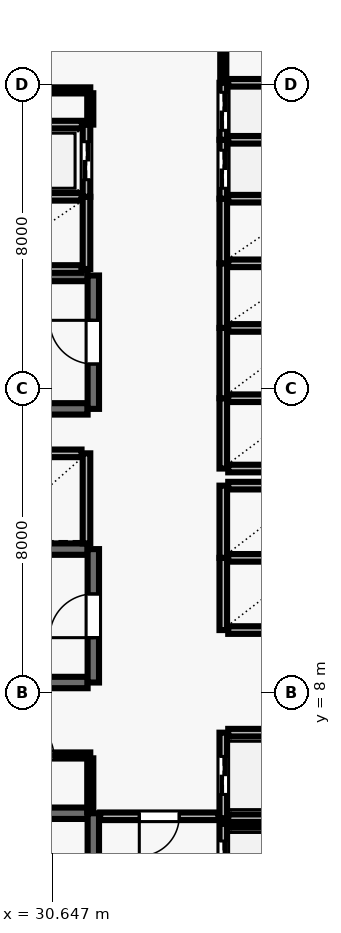
"""IFC4 building model, lengths in metres.
Left out: names, types, materials, properties, quantities, classifications, styles, units other than length and angle.
Written with IfcOpenShell. Run it as: python <this file> out.ifc"""

import sys

from ifc_helpers import new_model, si_unit, direction, frame, frame_2d, origin, place, context, subcontext, project, spatial, rectangle, extrude, element, fill, save


model = new_model("IFC4")
c1 = context("Model", 3, precision=1e-05, world=origin(), true_north=direction((0.0, 1.0)))
c2 = subcontext(c1, "Body", "Model", "MODEL_VIEW")
j1 = project(units=[si_unit("LENGTHUNIT", "METRE"), si_unit("PLANEANGLEUNIT", "RADIAN")], contexts=[c1])
p1 = place(None, origin())
s1 = spatial("IfcSite", under=j1, at=p1, CompositionType="ELEMENT")
p2 = place(p1, origin())
s2 = spatial("IfcBuilding", under=s1, at=p2, CompositionType="ELEMENT")
p3 = place(p2, frame((0.0, 0.0, 77.8)))
s3 = spatial("IfcBuildingStorey", under=s2, at=p3, CompositionType="ELEMENT", Elevation=77.8)
p4 = place(p3, frame((31.58, 4.83, 0.0), z_axis=(0.0, 0.0, 1.0), x_axis=(-1.0, 0.0, 0.0)))
e1 = element("IfcWall", 1, at=p4, inside=s3, PredefinedType="SHEAR", context=c2, shape_type="SweptSolid", body=[
    extrude(rectangle(XDim=8.36, YDim=0.3, at=frame_2d((4.18, 0.0))), origin(), (0.0, 0.0, 1.0), 3.69),
])
p5 = place(p3, frame((31.73, 0.96, 0.0), z_axis=(0.0, 0.0, 1.0), x_axis=(0.0, 1.0, 0.0)))
e2 = element("IfcWall", 2, at=p5, inside=s3, PredefinedType="SHEAR", context=c2, shape_type="SweptSolid", body=[
    extrude(rectangle(XDim=3.87, YDim=0.3, at=frame_2d((1.935, 0.0))), origin(), (0.0, 0.0, 1.0), 3.69),
])
p6 = place(p5, frame((1.54, 0.0, 0.0)))
e3 = element("IfcOpeningElement", 3, at=p6, cuts=e2, PredefinedType="OPENING", context=c2, shape_type="SweptSolid", body=[
    extrude(rectangle(XDim=1.15, YDim=2.15, at=frame_2d((0.575, 1.075))), frame((0.0, 0.16, 0.0), z_axis=(0.0, -1.0, 0.0), x_axis=(1.0, 0.0, 0.0)), (0.0, 0.0, 1.0), 0.32),
])
for number, where, z_axis, x_axis in (
    (4, (31.58, 18.98, 0.0), (0.0, 0.0, 1.0), (-1.0, 0.0, 0.0)),
    (5, (23.22, 15.47, 0.0), (0.0, 0.0, 1.0), (1.0, 0.0, 0.0)),
):
    element("IfcWall", number, at=place(p3, frame(where, z_axis=z_axis, x_axis=x_axis)), inside=s3, PredefinedType="SHEAR", context=c2, shape_type="SweptSolid", body=[
        extrude(rectangle(XDim=8.36, YDim=0.3, at=frame_2d((4.18, 0.0))), origin(), (0.0, 0.0, 1.0), 3.69),
    ])
p7 = place(p3, frame((31.73, 15.47, 0.0), z_axis=(0.0, 0.0, 1.0), x_axis=(0.0, 1.0, 0.0)))
e6 = element("IfcWall", 6, at=p7, inside=s3, PredefinedType="SHEAR", context=c2, shape_type="SweptSolid", body=[
    extrude(rectangle(XDim=3.51, YDim=0.3, at=frame_2d((1.755, 0.0))), origin(), (0.0, 0.0, 1.0), 3.69),
])
p8 = place(p7, frame((1.18, 0.0, 0.0)))
e7 = element("IfcOpeningElement", 7, at=p8, cuts=e6, PredefinedType="OPENING", context=c2, shape_type="SweptSolid", body=[
    extrude(rectangle(XDim=1.15, YDim=2.15, at=frame_2d((0.575, 1.075))), frame((0.0, 0.16, 0.0), z_axis=(0.0, -1.0, 0.0), x_axis=(1.0, 0.0, 0.0)), (0.0, 0.0, 1.0), 0.32),
])
for number, where, z_axis, x_axis in (
    (8, (31.58, 11.78, 0.0), (0.0, 0.0, 1.0), (-1.0, 0.0, 0.0)),
    (9, (23.22, 8.27, 0.0), (0.0, 0.0, 1.0), (1.0, 0.0, 0.0)),
):
    element("IfcWall", number, at=place(p3, frame(where, z_axis=z_axis, x_axis=x_axis)), inside=s3, PredefinedType="SHEAR", context=c2, shape_type="SweptSolid", body=[
        extrude(rectangle(XDim=8.36, YDim=0.3, at=frame_2d((4.18, 0.0))), origin(), (0.0, 0.0, 1.0), 3.69),
    ])
p9 = place(p3, frame((31.73, 8.27, 0.0), z_axis=(0.0, 0.0, 1.0), x_axis=(0.0, 1.0, 0.0)))
e10 = element("IfcWall", 10, at=p9, inside=s3, PredefinedType="SHEAR", context=c2, shape_type="SweptSolid", body=[
    extrude(rectangle(XDim=3.51, YDim=0.3, at=frame_2d((1.755, 0.0))), origin(), (0.0, 0.0, 1.0), 3.69),
])
p10 = place(p9, frame((1.18, 0.0, 0.0)))
e11 = element("IfcOpeningElement", 11, at=p10, cuts=e10, PredefinedType="OPENING", context=c2, shape_type="SweptSolid", body=[
    extrude(rectangle(XDim=1.15, YDim=2.15, at=frame_2d((0.575, 1.075))), frame((0.0, 0.16, 0.0), z_axis=(0.0, -1.0, 0.0), x_axis=(1.0, 0.0, 0.0)), (0.0, 0.0, 1.0), 0.32),
])
p11 = place(p3, frame((35.15, 4.55, 0.0), z_axis=(0.0, 0.0, 1.0), x_axis=(0.0, -1.0, 0.0)))
e12 = element("IfcWall", 12, at=p11, inside=s3, PredefinedType="SOLIDWALL", context=c2, shape_type="SweptSolid", body=[
    extrude(rectangle(XDim=2.1, YDim=0.2, at=frame_2d((1.05, 0.0))), origin(), (0.0, 0.0, 1.0), 3.69),
])
p12 = place(p11, frame((0.45, 0.0, 0.0)))
e13 = element("IfcOpeningElement", 13, at=p12, cuts=e12, PredefinedType="OPENING", context=c2, shape_type="SweptSolid", body=[
    extrude(rectangle(XDim=1.2, YDim=2.15, at=frame_2d((0.6, 1.075))), frame((0.0, 0.11, 0.0), z_axis=(0.0, -1.0, 0.0), x_axis=(1.0, 0.0, 0.0)), (0.0, 0.0, 1.0), 0.22),
])
p13 = place(p3, frame((37.42, 4.55, 0.0), z_axis=(0.0, 0.0, 1.0), x_axis=(-1.0, 0.0, 0.0)))
e14 = element("IfcWall", 14, at=p13, inside=s3, PredefinedType="SOLIDWALL", context=c2, shape_type="SweptSolid", body=[
    extrude(rectangle(XDim=2.14, YDim=0.2, at=frame_2d((1.07, 0.0))), origin(), (0.0, 0.0, 1.0), 3.69),
])
p14 = place(p3, frame((35.15, 6.95, 0.0), z_axis=(0.0, 0.0, 1.0), x_axis=(0.0, -1.0, 0.0)))
e15 = element("IfcWall", 15, at=p14, inside=s3, PredefinedType="SOLIDWALL", context=c2, shape_type="SweptSolid", body=[
    extrude(rectangle(XDim=2.25, YDim=0.2, at=frame_2d((1.125, 0.0))), origin(), (0.0, 0.0, 1.0), 3.69),
])
p15 = place(p14, frame((0.625, 0.0, 0.0)))
e16 = element("IfcOpeningElement", 16, at=p15, cuts=e15, PredefinedType="OPENING", context=c2, shape_type="SweptSolid", body=[
    extrude(rectangle(XDim=1.0, YDim=2.1, at=frame_2d((0.5, 1.05))), frame((0.0, 0.11, 0.0), z_axis=(0.0, -1.0, 0.0), x_axis=(1.0, 0.0, 0.0)), (0.0, 0.0, 1.0), 0.22),
])
for number, where, z_axis, x_axis in (
    (17, (35.28, 4.7, 0.0), (0.0, 0.0, 1.0), (1.0, 0.0, 0.0)),
    (18, (37.42, 6.95, 0.0), (0.0, 0.0, 1.0), (-1.0, 0.0, 0.0)),
):
    element("IfcWall", number, at=place(p3, frame(where, z_axis=z_axis, x_axis=x_axis)), inside=s3, PredefinedType="SOLIDWALL", context=c2, shape_type="SweptSolid", body=[
        extrude(rectangle(XDim=2.14, YDim=0.2, at=frame_2d((1.07, 0.0))), origin(), (0.0, 0.0, 1.0), 3.69),
    ])
p16 = place(p3, frame((35.15, 11.55, 0.0), z_axis=(0.0, 0.0, 1.0), x_axis=(0.0, -1.0, 0.0)))
e19 = element("IfcWall", 19, at=p16, inside=s3, PredefinedType="SOLIDWALL", context=c2, shape_type="SweptSolid", body=[
    extrude(rectangle(XDim=1.9, YDim=0.2, at=frame_2d((0.95, 0.0))), origin(), (0.0, 0.0, 1.0), 3.69),
])
for number, where, z_axis, x_axis in (
    (20, (35.28, 9.65, 0.0), (0.0, 0.0, 1.0), (1.0, 0.0, 0.0)),
    (21, (37.42, 11.55, 0.0), (0.0, 0.0, 1.0), (-1.0, 0.0, 0.0)),
):
    element("IfcWall", number, at=place(p3, frame(where, z_axis=z_axis, x_axis=x_axis)), inside=s3, PredefinedType="SOLIDWALL", context=c2, shape_type="SweptSolid", body=[
        extrude(rectangle(XDim=2.14, YDim=0.2, at=frame_2d((1.07, 0.0))), origin(), (0.0, 0.0, 1.0), 3.69),
    ])
p17 = place(p3, frame((35.15, 13.45, 0.0), z_axis=(0.0, 0.0, 1.0), x_axis=(0.0, -1.0, 0.0)))
e22 = element("IfcWall", 22, at=p17, inside=s3, PredefinedType="SOLIDWALL", context=c2, shape_type="SweptSolid", body=[
    extrude(rectangle(XDim=1.9, YDim=0.2, at=frame_2d((0.95, 0.0))), origin(), (0.0, 0.0, 1.0), 3.69),
])
p18 = place(p3, frame((37.42, 13.45, 0.0), z_axis=(0.0, 0.0, 1.0), x_axis=(-1.0, 0.0, 0.0)))
e23 = element("IfcWall", 23, at=p18, inside=s3, PredefinedType="SOLIDWALL", context=c2, shape_type="SweptSolid", body=[
    extrude(rectangle(XDim=2.14, YDim=0.2, at=frame_2d((1.07, 0.0))), origin(), (0.0, 0.0, 1.0), 3.69),
])
p19 = place(p3, frame((31.55, 11.93, 0.0), z_axis=(0.0, 0.0, 1.0), x_axis=(0.0, 1.0, 0.0)))
e24 = element("IfcWall", 24, at=p19, inside=s3, PredefinedType="SOLIDWALL", context=c2, shape_type="SweptSolid", body=[
    extrude(rectangle(XDim=2.37, YDim=0.2, at=frame_2d((1.185, 0.0))), origin(), (0.0, 0.0, 1.0), 3.69),
])
p20 = place(p3, frame((31.42, 14.3, 0.0), z_axis=(0.0, 0.0, 1.0), x_axis=(-1.0, 0.0, 0.0)))
e25 = element("IfcWall", 25, at=p20, inside=s3, PredefinedType="SOLIDWALL", context=c2, shape_type="SweptSolid", body=[
    extrude(rectangle(XDim=2.44, YDim=0.2, at=frame_2d((1.22, 0.0))), origin(), (0.0, 0.0, 1.0), 3.69),
])
p21 = place(p3, frame((35.15, 15.75, 0.0), z_axis=(0.0, 0.0, 1.0), x_axis=(0.0, -1.0, 0.0)))
e26 = element("IfcWall", 26, at=p21, inside=s3, PredefinedType="SOLIDWALL", context=c2, shape_type="SweptSolid", body=[
    extrude(rectangle(XDim=1.85, YDim=0.2, at=frame_2d((0.925, 0.0))), origin(), (0.0, 0.0, 1.0), 3.69),
])
for number, where, z_axis, x_axis in (
    (27, (35.28, 13.9, 0.0), (0.0, 0.0, 1.0), (1.0, 0.0, 0.0)),
    (28, (37.42, 15.75, 0.0), (0.0, 0.0, 1.0), (-1.0, 0.0, 0.0)),
):
    element("IfcWall", number, at=place(p3, frame(where, z_axis=z_axis, x_axis=x_axis)), inside=s3, PredefinedType="SOLIDWALL", context=c2, shape_type="SweptSolid", body=[
        extrude(rectangle(XDim=2.14, YDim=0.2, at=frame_2d((1.07, 0.0))), origin(), (0.0, 0.0, 1.0), 3.69),
    ])
p22 = place(p3, frame((35.15, 17.6, 0.0), z_axis=(0.0, 0.0, 1.0), x_axis=(0.0, -1.0, 0.0)))
e29 = element("IfcWall", 29, at=p22, inside=s3, PredefinedType="SOLIDWALL", context=c2, shape_type="SweptSolid", body=[
    extrude(rectangle(XDim=1.85, YDim=0.2, at=frame_2d((0.925, 0.0))), origin(), (0.0, 0.0, 1.0), 3.69),
])
p23 = place(p3, frame((37.42, 17.6, 0.0), z_axis=(0.0, 0.0, 1.0), x_axis=(-1.0, 0.0, 0.0)))
e30 = element("IfcWall", 30, at=p23, inside=s3, PredefinedType="SOLIDWALL", context=c2, shape_type="SweptSolid", body=[
    extrude(rectangle(XDim=2.14, YDim=0.2, at=frame_2d((1.07, 0.0))), origin(), (0.0, 0.0, 1.0), 3.69),
])
p24 = place(p3, frame((35.15, 19.3, 0.0), z_axis=(0.0, 0.0, 1.0), x_axis=(0.0, -1.0, 0.0)))
e31 = element("IfcWall", 31, at=p24, inside=s3, PredefinedType="SOLIDWALL", context=c2, shape_type="SweptSolid", body=[
    extrude(rectangle(XDim=1.7, YDim=0.2, at=frame_2d((0.85, 0.0))), origin(), (0.0, 0.0, 1.0), 3.69),
])
p25 = place(p3, frame((37.42, 19.3, 0.0), z_axis=(0.0, 0.0, 1.0), x_axis=(-1.0, 0.0, 0.0)))
e32 = element("IfcWall", 32, at=p25, inside=s3, PredefinedType="SOLIDWALL", context=c2, shape_type="SweptSolid", body=[
    extrude(rectangle(XDim=2.14, YDim=0.2, at=frame_2d((1.07, 0.0))), origin(), (0.0, 0.0, 1.0), 3.69),
])
p26 = place(p3, frame((35.15, 21.0, 0.0), z_axis=(0.0, 0.0, 1.0), x_axis=(0.0, -1.0, 0.0)))
e33 = element("IfcWall", 33, at=p26, inside=s3, PredefinedType="SOLIDWALL", context=c2, shape_type="SweptSolid", body=[
    extrude(rectangle(XDim=1.7, YDim=0.2, at=frame_2d((0.85, 0.0))), origin(), (0.0, 0.0, 1.0), 3.69),
])
p27 = place(p3, frame((37.42, 21.0, 0.0), z_axis=(0.0, 0.0, 1.0), x_axis=(-1.0, 0.0, 0.0)))
e34 = element("IfcWall", 34, at=p27, inside=s3, PredefinedType="SOLIDWALL", context=c2, shape_type="SweptSolid", body=[
    extrude(rectangle(XDim=2.14, YDim=0.2, at=frame_2d((1.07, 0.0))), origin(), (0.0, 0.0, 1.0), 3.69),
])
p28 = place(p3, frame((31.55, 19.15, 0.0), z_axis=(0.0, 0.0, 1.0), x_axis=(0.0, 1.0, 0.0)))
e35 = element("IfcWall", 35, at=p28, inside=s3, PredefinedType="SOLIDWALL", context=c2, shape_type="SweptSolid", body=[
    extrude(rectangle(XDim=1.9, YDim=0.2, at=frame_2d((0.95, 0.0))), origin(), (0.0, 0.0, 1.0), 3.69),
])
for number, where, z_axis, x_axis in (
    (36, (28.98, 19.15, 0.0), (0.0, 0.0, 1.0), (1.0, 0.0, 0.0)),
    (37, (31.42, 21.05, 0.0), (0.0, 0.0, 1.0), (-1.0, 0.0, 0.0)),
):
    element("IfcWall", number, at=place(p3, frame(where, z_axis=z_axis, x_axis=x_axis)), inside=s3, PredefinedType="SOLIDWALL", context=c2, shape_type="SweptSolid", body=[
        extrude(rectangle(XDim=2.44, YDim=0.2, at=frame_2d((1.22, 0.0))), origin(), (0.0, 0.0, 1.0), 3.69),
    ])
p29 = place(p3, frame((35.15, 22.55, 0.0), z_axis=(0.0, 0.0, 1.0), x_axis=(0.0, -1.0, 0.0)))
e38 = element("IfcWall", 38, at=p29, inside=s3, PredefinedType="SOLIDWALL", context=c2, shape_type="SweptSolid", body=[
    extrude(rectangle(XDim=1.55, YDim=0.2, at=frame_2d((0.775, 0.0))), origin(), (0.0, 0.0, 1.0), 3.69),
])
p30 = place(p29, frame((0.275, 0.0, 0.0)))
e39 = element("IfcOpeningElement", 39, at=p30, cuts=e38, PredefinedType="OPENING", context=c2, shape_type="SweptSolid", body=[
    extrude(rectangle(XDim=1.0, YDim=2.1, at=frame_2d((0.5, 1.05))), frame((0.0, 0.11, 0.0), z_axis=(0.0, -1.0, 0.0), x_axis=(1.0, 0.0, 0.0)), (0.0, 0.0, 1.0), 0.22),
])
p31 = place(p3, frame((37.42, 22.55, 0.0), z_axis=(0.0, 0.0, 1.0), x_axis=(-1.0, 0.0, 0.0)))
e40 = element("IfcWall", 40, at=p31, inside=s3, PredefinedType="SOLIDWALL", context=c2, shape_type="SweptSolid", body=[
    extrude(rectangle(XDim=2.14, YDim=0.2, at=frame_2d((1.07, 0.0))), origin(), (0.0, 0.0, 1.0), 3.69),
])
p32 = place(p3, frame((35.15, 24.05, 0.0), z_axis=(0.0, 0.0, 1.0), x_axis=(0.0, -1.0, 0.0)))
e41 = element("IfcWall", 41, at=p32, inside=s3, PredefinedType="SOLIDWALL", context=c2, shape_type="SweptSolid", body=[
    extrude(rectangle(XDim=1.5, YDim=0.2, at=frame_2d((0.75, 0.0))), origin(), (0.0, 0.0, 1.0), 3.69),
])
p33 = place(p32, frame((0.25, 0.0, 0.0)))
e42 = element("IfcOpeningElement", 42, at=p33, cuts=e41, PredefinedType="OPENING", context=c2, shape_type="SweptSolid", body=[
    extrude(rectangle(XDim=1.0, YDim=2.1, at=frame_2d((0.5, 1.05))), frame((0.0, 0.11, 0.0), z_axis=(0.0, -1.0, 0.0), x_axis=(1.0, 0.0, 0.0)), (0.0, 0.0, 1.0), 0.22),
])
p34 = place(p3, frame((37.42, 24.05, 0.0), z_axis=(0.0, 0.0, 1.0), x_axis=(-1.0, 0.0, 0.0)))
e43 = element("IfcWall", 43, at=p34, inside=s3, PredefinedType="SOLIDWALL", context=c2, shape_type="SweptSolid", body=[
    extrude(rectangle(XDim=2.14, YDim=0.2, at=frame_2d((1.07, 0.0))), origin(), (0.0, 0.0, 1.0), 3.69),
])
p35 = place(p3, frame((31.55, 21.05, 0.0), z_axis=(0.0, 0.0, 1.0), x_axis=(0.0, 1.0, 0.0)))
e44 = element("IfcWall", 44, at=p35, inside=s3, PredefinedType="SOLIDWALL", context=c2, shape_type="SweptSolid", body=[
    extrude(rectangle(XDim=1.9, YDim=0.2, at=frame_2d((0.95, 0.0))), origin(), (0.0, 0.0, 1.0), 3.69),
])
p36 = place(p35, frame((0.45, 0.0, 0.0)))
e45 = element("IfcOpeningElement", 45, at=p36, cuts=e44, PredefinedType="OPENING", context=c2, shape_type="SweptSolid", body=[
    extrude(rectangle(XDim=1.0, YDim=2.1, at=frame_2d((0.5, 1.05))), frame((0.0, 0.11, 0.0), z_axis=(0.0, -1.0, 0.0), x_axis=(1.0, 0.0, 0.0)), (0.0, 0.0, 1.0), 0.22),
])
p37 = place(p3, frame((31.43, 22.95, 0.0), z_axis=(0.0, 0.0, 1.0), x_axis=(-1.0, 0.0, 0.0)))
e46 = element("IfcWall", 46, at=p37, inside=s3, PredefinedType="SOLIDWALL", context=c2, shape_type="SweptSolid", body=[
    extrude(rectangle(XDim=2.46, YDim=0.2, at=frame_2d((1.23, 0.0))), origin(), (0.0, 0.0, 1.0), 3.69),
])
p38 = place(p3, frame((28.8, 23.85, 0.0), z_axis=(0.0, 0.0, 1.0), x_axis=(1.0, 0.0, 0.0)))
e47 = element("IfcWall", 47, at=p38, inside=s3, PredefinedType="PARTITIONING", context=c2, shape_type="SweptSolid", body=[
    extrude(rectangle(XDim=2.85, YDim=0.16, at=frame_2d((1.425, 0.0))), origin(), (0.0, 0.0, 1.0), 3.69),
])
p39 = place(p3, frame((28.85, 6.35, 0.0), z_axis=(0.0, 0.0, 1.0), x_axis=(1.0, 0.0, 0.0)))
e48 = element("IfcWall", 48, at=p39, inside=s3, PredefinedType="PARTITIONING", context=c2, shape_type="SweptSolid", body=[
    extrude(rectangle(XDim=2.8, YDim=0.16, at=frame_2d((1.4, 0.0))), origin(), (0.0, 0.0, 1.0), 3.69),
])
p40 = place(p39, frame((0.96, 0.0, 0.0)))
e49 = element("IfcOpeningElement", 49, at=p40, cuts=e48, PredefinedType="OPENING", context=c2, shape_type="SweptSolid", body=[
    extrude(rectangle(XDim=0.88, YDim=2.1, at=frame_2d((0.44, 1.05))), frame((0.0, 0.09, 0.0), z_axis=(0.0, -1.0, 0.0), x_axis=(1.0, 0.0, 0.0)), (0.0, 0.0, 1.0), 0.18),
])
p41 = place(p3, frame((35.02, 4.75, 0.0), z_axis=(0.0, 0.0, 1.0), x_axis=(-1.0, 0.0, 0.0)))
e50 = element("IfcWall", 50, at=p41, inside=s3, PredefinedType="SOLIDWALL", context=c2, shape_type="SweptSolid", body=[
    extrude(rectangle(XDim=3.11, YDim=0.2, at=frame_2d((1.555, 0.0))), origin(), (0.0, 0.0, 1.0), 3.69),
])
p42 = place(p41, frame((1.03, 0.0, 0.0)))
e51 = element("IfcOpeningElement", 51, at=p42, cuts=e50, PredefinedType="OPENING", context=c2, shape_type="SweptSolid", body=[
    extrude(rectangle(XDim=1.05, YDim=2.15, at=frame_2d((0.525, 1.075))), frame((0.0, 0.11, 0.0), z_axis=(0.0, -1.0, 0.0), x_axis=(1.0, 0.0, 0.0)), (0.0, 0.0, 1.0), 0.22),
])
p43 = place(p3, frame((31.65, 4.86, 0.0), z_axis=(0.0, 0.0, 1.0), x_axis=(0.0, 1.0, 0.0)))
e52 = element("IfcWall", 52, at=p43, inside=s3, PredefinedType="PARTITIONING", context=c2, shape_type="SweptSolid", body=[
    extrude(rectangle(XDim=1.415, YDim=0.16, at=frame_2d((0.708, 0.0))), origin(), (0.0, 0.0, 1.0), 3.69),
])
p44 = place(p3, frame((31.65, 23.775, 0.0), z_axis=(0.0, 0.0, 1.0), x_axis=(0.0, -1.0, 0.0)))
e53 = element("IfcWall", 53, at=p44, inside=s3, PredefinedType="PARTITIONING", context=c2, shape_type="SweptSolid", body=[
    extrude(rectangle(XDim=0.825, YDim=0.16, at=frame_2d((0.413, 0.0))), origin(), (0.0, 0.0, 1.0), 3.69),
])
p45 = place(p3, frame((35.15, 24.07, 0.0), z_axis=(0.0, 0.0, 1.0), x_axis=(0.0, 1.0, 0.0)))
e54 = element("IfcWall", 54, at=p45, inside=s3, PredefinedType="PARTITIONING", context=c2, shape_type="SweptSolid", body=[
    extrude(rectangle(XDim=1.855, YDim=0.16, at=frame_2d((0.927, 0.0))), origin(), (0.0, 0.0, 1.0), 3.69),
])
p46 = place(p8, origin())
e55 = element("IfcDoor", 55, at=p46, inside=s3, OperationType="SINGLE_SWING_RIGHT", PredefinedType="DOOR", context=c2, shape_type="SweptSolid", body=[
    extrude(rectangle(XDim=1.15, YDim=2.15, at=frame_2d((0.575, 1.075))), frame((0.0, 0.025, 0.0), z_axis=(0.0, -1.0, 0.0), x_axis=(1.0, 0.0, 0.0)), (0.0, 0.0, 1.0), 0.05),
])
fill(e7, e55)
p47 = place(p10, origin())
e56 = element("IfcDoor", 56, at=p47, inside=s3, OperationType="SINGLE_SWING_LEFT", PredefinedType="DOOR", context=c2, shape_type="SweptSolid", body=[
    extrude(rectangle(XDim=1.15, YDim=2.15, at=frame_2d((0.575, 1.075))), frame((0.0, 0.025, 0.0), z_axis=(0.0, -1.0, 0.0), x_axis=(1.0, 0.0, 0.0)), (0.0, 0.0, 1.0), 0.05),
])
fill(e11, e56)
p48 = place(p12, origin())
e57 = element("IfcDoor", 57, at=p48, inside=s3, OperationType="DOUBLE_DOOR_SLIDING", PredefinedType="DOOR", context=c2, shape_type="SweptSolid", body=[
    extrude(rectangle(XDim=1.2, YDim=2.15, at=frame_2d((0.6, 1.075))), frame((0.0, 0.025, 0.0), z_axis=(0.0, -1.0, 0.0), x_axis=(1.0, 0.0, 0.0)), (0.0, 0.0, 1.0), 0.05),
])
fill(e13, e57)
p49 = place(p15, origin())
e58 = element("IfcDoor", 58, at=p49, inside=s3, OperationType="DOUBLE_DOOR_SLIDING", PredefinedType="DOOR", context=c2, shape_type="SweptSolid", body=[
    extrude(rectangle(XDim=1.0, YDim=2.1, at=frame_2d((0.5, 1.05))), frame((0.0, 0.025, 0.0), z_axis=(0.0, -1.0, 0.0), x_axis=(1.0, 0.0, 0.0)), (0.0, 0.0, 1.0), 0.05),
])
fill(e16, e58)
p50 = place(p30, origin())
e59 = element("IfcDoor", 59, at=p50, inside=s3, OperationType="DOUBLE_DOOR_SLIDING", PredefinedType="DOOR", context=c2, shape_type="SweptSolid", body=[
    extrude(rectangle(XDim=1.0, YDim=2.1, at=frame_2d((0.5, 1.05))), frame((0.0, 0.025, 0.0), z_axis=(0.0, -1.0, 0.0), x_axis=(1.0, 0.0, 0.0)), (0.0, 0.0, 1.0), 0.05),
])
fill(e39, e59)
p51 = place(p33, origin())
e60 = element("IfcDoor", 60, at=p51, inside=s3, OperationType="DOUBLE_DOOR_SLIDING", PredefinedType="DOOR", context=c2, shape_type="SweptSolid", body=[
    extrude(rectangle(XDim=1.0, YDim=2.1, at=frame_2d((0.5, 1.05))), frame((0.0, 0.025, 0.0), z_axis=(0.0, -1.0, 0.0), x_axis=(1.0, 0.0, 0.0)), (0.0, 0.0, 1.0), 0.05),
])
fill(e42, e60)
p52 = place(p36, origin())
e61 = element("IfcDoor", 61, at=p52, inside=s3, OperationType="DOUBLE_DOOR_SLIDING", PredefinedType="DOOR", context=c2, shape_type="SweptSolid", body=[
    extrude(rectangle(XDim=1.0, YDim=2.1, at=frame_2d((0.5, 1.05))), frame((0.0, 0.025, 0.0), z_axis=(0.0, -1.0, 0.0), x_axis=(1.0, 0.0, 0.0)), (0.0, 0.0, 1.0), 0.05),
])
fill(e45, e61)
p53 = place(p42, origin())
e62 = element("IfcDoor", 62, at=p53, inside=s3, OperationType="SINGLE_SWING_RIGHT", PredefinedType="DOOR", context=c2, shape_type="SweptSolid", body=[
    extrude(rectangle(XDim=1.05, YDim=2.15, at=frame_2d((0.525, 1.075))), frame((0.0, 0.025, 0.0), z_axis=(0.0, -1.0, 0.0), x_axis=(1.0, 0.0, 0.0)), (0.0, 0.0, 1.0), 0.05),
])
fill(e51, e62)
p54 = place(p40, origin())
e63 = element("IfcDoor", 63, at=p54, inside=s3, OperationType="SINGLE_SWING_LEFT", PredefinedType="DOOR", context=c2, shape_type="SweptSolid", body=[
    extrude(rectangle(XDim=0.88, YDim=2.1, at=frame_2d((0.44, 1.05))), frame((0.0, 0.025, 0.0), z_axis=(0.0, -1.0, 0.0), x_axis=(1.0, 0.0, 0.0)), (0.0, 0.0, 1.0), 0.05),
])
fill(e49, e63)
save(model, sys.argv[1])
